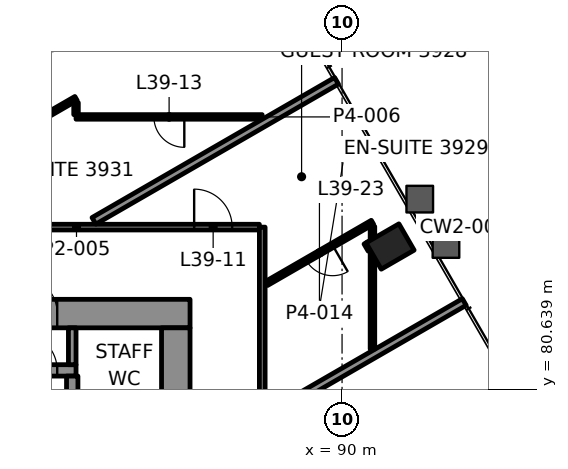
"""IFC4 building model, lengths in metres.
Left out: names, types, materials, properties, quantities, classifications, styles, units other than length and angle.
Written with IfcOpenShell. Run it as: python <this file> out.ifc"""

import sys

from ifc_helpers import new_model, si_unit, direction, frame, frame_2d, origin, origin_2d, place, context, subcontext, project, spatial, rectangle, hollow_rectangle, extrude, element, fill, save


model = new_model("IFC4")
c1 = context("Model", 3, precision=1e-05, world=origin(), true_north=direction((0.0, 1.0)))
c2 = subcontext(c1, "Body", "Model", "MODEL_VIEW")
j1 = project(units=[si_unit("LENGTHUNIT", "METRE"), si_unit("PLANEANGLEUNIT", "RADIAN")], contexts=[c1])
p1 = place(None, origin())
s1 = spatial("IfcSite", under=j1, at=p1, CompositionType="ELEMENT")
p2 = place(p1, origin())
s2 = spatial("IfcBuilding", under=s1, at=p2, CompositionType="ELEMENT")
p3 = place(p2, frame((0.0, 0.0, 171.4)))
s3 = spatial("IfcBuildingStorey", under=s2, at=p3, CompositionType="ELEMENT", Elevation=171.4)
p4 = place(p3, frame((91.263, 84.39, -0.0), z_axis=(0.0, 0.0, 1.0), x_axis=(-0.5, 0.866025403784, 0.0)))
e1 = element("IfcColumn", 1, at=p4, inside=s3, PredefinedType="COLUMN", context=c2, shape_type="SweptSolid", body=[
    extrude(hollow_rectangle(XDim=0.8, YDim=1.0, WallThickness=0.05, at=origin_2d()), origin(), (0.0, 0.0, 1.0), 3.9),
])
p5 = place(p3, frame((64.0, 82.625, 0.0), z_axis=(0.0, 0.0, 1.0), x_axis=(1.0, 0.0, 0.0)))
e2 = element("IfcWall", 2, at=p5, inside=s3, PredefinedType="SHEAR", context=c2, shape_type="SweptSolid", body=[
    extrude(rectangle(XDim=22.0, YDim=0.75, at=frame_2d((11.0, 0.0))), origin(), (0.0, 0.0, 1.0), 3.7),
])
p6 = place(p5, frame((3.695, 0.0, 0.0)))
e3 = element("IfcOpeningElement", 3, at=p6, cuts=e2, PredefinedType="OPENING", context=c2, shape_type="SweptSolid", body=[
    extrude(rectangle(XDim=1.0, YDim=2.1, at=frame_2d((0.5, 1.05))), frame((0.0, 0.385, 0.0), z_axis=(0.0, -1.0, 0.0), x_axis=(1.0, 0.0, 0.0)), (0.0, 0.0, 1.0), 0.77),
])
p7 = place(p5, frame((17.505, 0.0, 0.0)))
e4 = element("IfcOpeningElement", 4, at=p7, cuts=e2, PredefinedType="OPENING", context=c2, shape_type="SweptSolid", body=[
    extrude(rectangle(XDim=1.0, YDim=2.1, at=frame_2d((0.5, 1.05))), frame((0.0, 0.385, 0.0), z_axis=(0.0, -1.0, 0.0), x_axis=(1.0, 0.0, 0.0)), (0.0, 0.0, 1.0), 0.77),
])
p8 = place(p5, frame((10.65, 0.0, 0.0)))
e5 = element("IfcOpeningElement", 5, at=p8, cuts=e2, PredefinedType="OPENING", context=c2, shape_type="SweptSolid", body=[
    extrude(rectangle(XDim=0.9, YDim=2.1, at=frame_2d((0.45, 1.05))), frame((0.0, 0.385, 0.0), z_axis=(0.0, -1.0, 0.0), x_axis=(1.0, 0.0, 0.0)), (0.0, 0.0, 1.0), 0.77),
])
p9 = place(p3, frame((85.625, 67.75, 0.0), z_axis=(0.0, 0.0, 1.0), x_axis=(0.0, 1.0, 0.0)))
e6 = element("IfcWall", 6, at=p9, inside=s3, PredefinedType="SHEAR", context=c2, shape_type="SweptSolid", body=[
    extrude(rectangle(XDim=14.5, YDim=0.75, at=frame_2d((7.25, 0.0))), origin(), (0.0, 0.0, 1.0), 3.7),
])
p10 = place(p9, frame((4.65, 0.0, 0.0)))
e7 = element("IfcOpeningElement", 7, at=p10, cuts=e6, PredefinedType="OPENING", context=c2, shape_type="SweptSolid", body=[
    extrude(rectangle(XDim=1.8, YDim=2.1, at=frame_2d((0.9, 1.05))), frame((0.0, 0.385, 0.0), z_axis=(0.0, -1.0, 0.0), x_axis=(1.0, 0.0, 0.0)), (0.0, 0.0, 1.0), 0.77),
])
p11 = place(p9, frame((11.8, 0.0, 0.0)))
e8 = element("IfcOpeningElement", 8, at=p11, cuts=e6, PredefinedType="OPENING", context=c2, shape_type="SweptSolid", body=[
    extrude(rectangle(XDim=0.9, YDim=2.1, at=frame_2d((0.45, 1.05))), frame((0.0, 0.385, 0.0), z_axis=(0.0, -1.0, 0.0), x_axis=(1.0, 0.0, 0.0)), (0.0, 0.0, 1.0), 0.77),
])
p12 = place(p3, frame((76.14, 81.13, 0.0), z_axis=(0.0, 0.0, 1.0), x_axis=(1.0, 0.0, 0.0)))
e9 = element("IfcWall", 9, at=p12, inside=s3, PredefinedType="SHEAR", context=c2, shape_type="SweptSolid", body=[
    extrude(rectangle(XDim=6.86, YDim=0.3, at=frame_2d((3.43, 0.0))), origin(), (0.0, 0.0, 1.0), 3.7),
])
p13 = place(p12, frame((5.365, 0.0, 0.0)))
e10 = element("IfcOpeningElement", 10, at=p13, cuts=e9, PredefinedType="OPENING", context=c2, shape_type="SweptSolid", body=[
    extrude(rectangle(XDim=1.0, YDim=2.1, at=frame_2d((0.5, 1.05))), frame((0.0, 0.16, 0.0), z_axis=(0.0, -1.0, 0.0), x_axis=(1.0, 0.0, 0.0)), (0.0, 0.0, 1.0), 0.32),
])
p14 = place(p3, frame((82.9, 77.9, 0.0), z_axis=(0.0, 0.0, 1.0), x_axis=(0.0, 1.0, 0.0)))
e11 = element("IfcWall", 11, at=p14, inside=s3, PredefinedType="SHEAR", context=c2, shape_type="SweptSolid", body=[
    extrude(rectangle(XDim=3.08, YDim=0.3, at=frame_2d((1.54, 0.0))), origin(), (0.0, 0.0, 1.0), 3.7),
])
p15 = place(p3, frame((78.2, 84.9, 0.0), z_axis=(0.0, 0.0, 1.0), x_axis=(1.0, 0.0, 0.0)))
e12 = element("IfcWall", 12, at=p15, inside=s3, PredefinedType="PARTITIONING", context=c2, shape_type="SweptSolid", body=[
    extrude(rectangle(XDim=9.625, YDim=0.15, at=frame_2d((4.812, 0.0))), origin(), (0.0, 0.0, 1.0), 3.1),
])
p16 = place(p15, frame((7.908, 0.0, 0.0)))
e13 = element("IfcOpeningElement", 13, at=p16, cuts=e12, PredefinedType="OPENING", context=c2, shape_type="SweptSolid", body=[
    extrude(rectangle(XDim=1.0, YDim=2.1, at=frame_2d((0.5, 1.05))), frame((0.0, 0.085, 0.0), z_axis=(0.0, -1.0, 0.0), x_axis=(1.0, 0.0, 0.0)), (0.0, 0.0, 1.0), 0.17),
])
p17 = place(p3, frame((87.898, 87.8, 0.0), z_axis=(0.0, 0.0, 1.0), x_axis=(-1.0, 0.0, 0.0)))
e14 = element("IfcWall", 14, at=p17, inside=s3, PredefinedType="PARTITIONING", context=c2, shape_type="SweptSolid", body=[
    extrude(rectangle(XDim=4.898, YDim=0.12, at=frame_2d((2.449, 0.0))), origin(), (0.0, 0.0, 1.0), 3.1),
])
p18 = place(p17, frame((2.049, 0.0, 0.0)))
e15 = element("IfcOpeningElement", 15, at=p18, cuts=e14, PredefinedType="OPENING", context=c2, shape_type="SweptSolid", body=[
    extrude(rectangle(XDim=0.8, YDim=2.1, at=frame_2d((0.4, 1.05))), frame((0.0, 0.07, 0.0), z_axis=(0.0, -1.0, 0.0), x_axis=(1.0, 0.0, 0.0)), (0.0, 0.0, 1.0), 0.14),
])
p19 = place(p3, frame((88.027, 79.934, 0.0), z_axis=(0.0, 0.0, 1.0), x_axis=(0.866030178321, 0.499991730169, 0.0)))
e16 = element("IfcWall", 16, at=p19, inside=s3, PredefinedType="PARTITIONING", context=c2, shape_type="SweptSolid", body=[
    extrude(rectangle(XDim=5.991, YDim=0.2, at=frame_2d((2.995, 0.0))), origin(), (0.0, 0.0, 1.0), 3.022),
])
p20 = place(p3, frame((90.8, 85.028, 0.0), z_axis=(0.0, 0.0, 1.0), x_axis=(-0.866010186656, -0.500026355914, 0.0)))
e17 = element("IfcWall", 17, at=p20, inside=s3, PredefinedType="PARTITIONING", context=c2, shape_type="SweptSolid", body=[
    extrude(rectangle(XDim=3.222, YDim=0.12, at=frame_2d((1.611, 0.0))), origin(), (0.0, 0.0, 1.0), 3.022),
])
p21 = place(p20, frame((1.211, 0.0, 0.0)))
e18 = element("IfcOpeningElement", 18, at=p21, cuts=e17, PredefinedType="OPENING", context=c2, shape_type="SweptSolid", body=[
    extrude(rectangle(XDim=0.8, YDim=2.1, at=frame_2d((0.4, 1.05))), frame((0.0, 0.07, 0.0), z_axis=(0.0, -1.0, 0.0), x_axis=(1.0, 0.0, 0.0)), (0.0, 0.0, 1.0), 0.14),
])
p22 = place(p3, frame((83.471, 85.065, 0.0), z_axis=(0.0, 0.0, 1.0), x_axis=(0.866022862013, 0.500004402451, 0.0)))
e19 = element("IfcWall", 19, at=p22, inside=s3, PredefinedType="PARTITIONING", context=c2, shape_type="SweptSolid", body=[
    extrude(rectangle(XDim=7.371, YDim=0.2, at=frame_2d((3.685, 0.0))), origin(), (0.0, 0.0, 1.0), 3.022),
])
p23 = place(p3, frame((80.209, 86.675, 0.0), z_axis=(0.0, 0.0, 1.0), x_axis=(0.86604299788, 0.499969524894, 0.0)))
e20 = element("IfcWall", 20, at=p23, inside=s3, PredefinedType="PARTITIONING", context=c2, shape_type="SweptSolid", body=[
    extrude(rectangle(XDim=3.222, YDim=0.12, at=frame_2d((1.611, 0.0))), origin(), (0.0, 0.0, 1.0), 3.1),
])
p24 = place(p3, frame((90.8, 81.69, 0.0), z_axis=(0.0, 0.0, 1.0), x_axis=(0.0, 1.0, 0.0)))
e21 = element("IfcWall", 21, at=p24, inside=s3, PredefinedType="PARTITIONING", context=c2, shape_type="SweptSolid", body=[
    extrude(rectangle(XDim=2.502, YDim=0.12, at=frame_2d((1.251, 0.0))), origin(), (0.0, 0.0, 1.0), 3.1),
])
p25 = place(p3, frame((90.8, 84.584, 0.0), z_axis=(0.0, 0.0, 1.0), x_axis=(0.0, 1.0, 0.0)))
e22 = element("IfcWall", 22, at=p25, inside=s3, PredefinedType="PARTITIONING", context=c2, shape_type="SweptSolid", body=[
    extrude(rectangle(XDim=0.334, YDim=0.12, at=frame_2d((0.167, 0.0))), origin(), (0.0, 0.0, 1.0), 3.022),
])
p26 = place(p3, frame((87.9, 84.899, 0.0), z_axis=(0.0, 0.0, 1.0), x_axis=(0.0, -1.0, 0.0)))
e23 = element("IfcWall", 23, at=p26, inside=s3, PredefinedType="PARTITIONING", context=c2, shape_type="SweptSolid", body=[
    extrude(rectangle(XDim=16.308, YDim=0.15, at=frame_2d((8.154, 0.0))), origin(), (0.0, 0.0, 1.0), 3.1),
])
p27 = place(p26, frame((5.527, 0.0, 0.0)))
e24 = element("IfcOpeningElement", 24, at=p27, cuts=e23, PredefinedType="OPENING", context=c2, shape_type="SweptSolid", body=[
    extrude(rectangle(XDim=1.0, YDim=2.1, at=frame_2d((0.5, 1.05))), frame((0.0, 0.085, 0.0), z_axis=(0.0, -1.0, 0.0), x_axis=(1.0, 0.0, 0.0)), (0.0, 0.0, 1.0), 0.17),
])
p28 = place(p26, frame((13.074, 0.0, 0.0)))
e25 = element("IfcOpeningElement", 25, at=p28, cuts=e23, PredefinedType="OPENING", context=c2, shape_type="SweptSolid", body=[
    extrude(rectangle(XDim=1.0, YDim=2.1, at=frame_2d((0.5, 1.05))), frame((0.0, 0.085, 0.0), z_axis=(0.0, -1.0, 0.0), x_axis=(1.0, 0.0, 0.0)), (0.0, 0.0, 1.0), 0.17),
])
p29 = place(p3, frame((83.0, 87.86, 0.0), z_axis=(0.0, 0.0, 1.0), x_axis=(0.0, 1.0, 0.0)))
e26 = element("IfcWall", 26, at=p29, inside=s3, PredefinedType="PARTITIONING", context=c2, shape_type="SweptSolid", body=[
    extrude(rectangle(XDim=0.316, YDim=0.12, at=frame_2d((0.158, 0.0))), origin(), (0.0, 0.0, 1.0), 3.1),
])
p30 = place(p3, frame((90.74, 84.296, 0.0), z_axis=(0.0, 0.0, 1.0), x_axis=(-0.500333292614, 0.865832891673, 0.0)))
e27 = element("IfcWall", 27, at=p30, inside=s3, PredefinedType="PARTITIONING", context=c2, shape_type="SweptSolid", body=[
    extrude(rectangle(XDim=0.219, YDim=0.12, at=frame_2d((0.109, 0.0))), origin(), (0.0, 0.0, 1.0), 3.1),
])
p31 = place(p3, frame((82.9, 81.28, 0.0), z_axis=(0.0, 0.0, 1.0), x_axis=(0.0, 1.0, 0.0)))
e28 = element("IfcWall", 28, at=p31, inside=s3, PredefinedType="PARTITIONING", context=c2, shape_type="SweptSolid", body=[
    extrude(rectangle(XDim=0.97, YDim=0.2, at=frame_2d((0.485, 0.0))), origin(), (0.0, 0.0, 1.0), 3.7),
])
p32 = place(p16, origin())
e29 = element("IfcDoor", 29, at=p32, inside=s3, OperationType="SINGLE_SWING_LEFT", PredefinedType="DOOR", context=c2, shape_type="SweptSolid", body=[
    extrude(rectangle(XDim=1.0, YDim=2.1, at=frame_2d((0.5, 1.05))), frame((0.0, 0.025, 0.0), z_axis=(0.0, -1.0, 0.0), x_axis=(1.0, 0.0, 0.0)), (0.0, 0.0, 1.0), 0.05),
])
fill(e13, e29)
p33 = place(p18, origin())
e30 = element("IfcDoor", 30, at=p33, inside=s3, OperationType="SINGLE_SWING_LEFT", PredefinedType="DOOR", context=c2, shape_type="SweptSolid", body=[
    extrude(rectangle(XDim=0.8, YDim=2.1, at=frame_2d((0.4, 1.05))), frame((0.0, 0.025, 0.0), z_axis=(0.0, -1.0, 0.0), x_axis=(1.0, 0.0, 0.0)), (0.0, 0.0, 1.0), 0.05),
])
fill(e15, e30)
p34 = place(p21, origin())
e31 = element("IfcDoor", 31, at=p34, inside=s3, OperationType="SINGLE_SWING_LEFT", PredefinedType="DOOR", context=c2, shape_type="SweptSolid", body=[
    extrude(rectangle(XDim=0.8, YDim=2.1, at=frame_2d((0.4, 1.05))), frame((0.0, 0.025, 0.0), z_axis=(0.0, -1.0, 0.0), x_axis=(1.0, 0.0, 0.0)), (0.0, 0.0, 1.0), 0.05),
])
fill(e18, e31)
p35 = place(p13, origin())
e32 = element("IfcDoor", 32, at=p35, inside=s3, OperationType="SINGLE_SWING_RIGHT", PredefinedType="DOOR", context=c2, shape_type="SweptSolid", body=[
    extrude(rectangle(XDim=1.0, YDim=2.1, at=frame_2d((0.5, 1.05))), frame((0.0, 0.025, 0.0), z_axis=(0.0, -1.0, 0.0), x_axis=(1.0, 0.0, 0.0)), (0.0, 0.0, 1.0), 0.05),
])
fill(e10, e32)
p36 = place(p7, origin())
e33 = element("IfcDoor", 33, at=p36, inside=s3, OperationType="SINGLE_SWING_LEFT", PredefinedType="DOOR", context=c2, shape_type="SweptSolid", body=[
    extrude(rectangle(XDim=1.0, YDim=2.1, at=frame_2d((0.5, 1.05))), frame((0.0, 0.095, 0.0), z_axis=(0.0, -1.0, 0.0), x_axis=(1.0, 0.0, 0.0)), (0.0, 0.0, 1.0), 0.19),
])
fill(e4, e33)
save(model, sys.argv[1])
